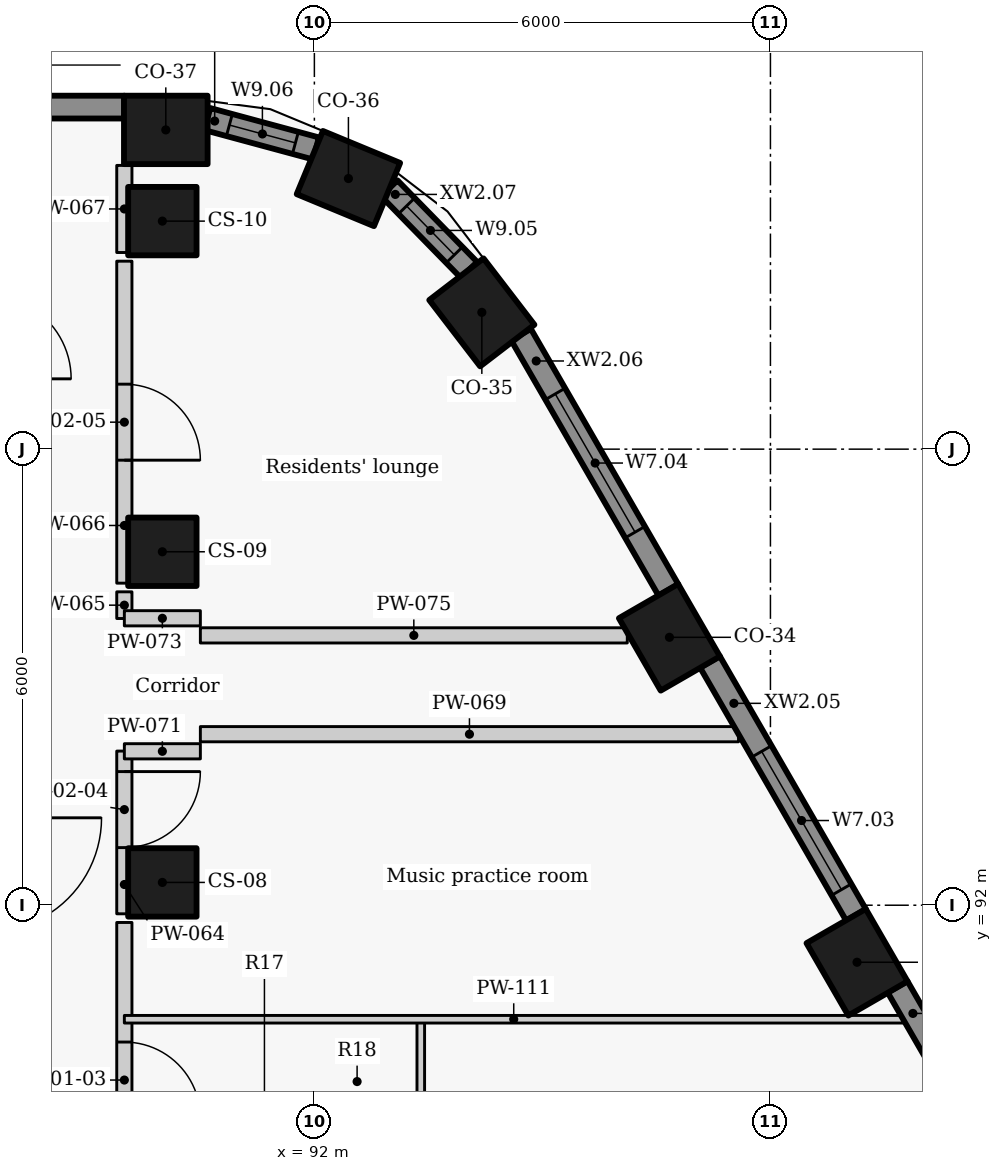
"""IFC4 building model, lengths in metres.
Left out: names, types, materials, properties, quantities, classifications, styles, units other than length and angle.
Written with IfcOpenShell. Run it as: python <this file> out.ifc"""

import sys

from ifc_helpers import new_model, si_unit, direction, frame, frame_2d, origin, origin_2d, place, context, subcontext, project, spatial, rectangle, extrude, element, fill, save


model = new_model("IFC4")
c1 = context("Model", 3, precision=1e-05, world=origin(), true_north=direction((0.0, 1.0)))
c2 = subcontext(c1, "Body", "Model", "MODEL_VIEW")
j1 = project(units=[si_unit("LENGTHUNIT", "METRE"), si_unit("PLANEANGLEUNIT", "RADIAN")], contexts=[c1])
p1 = place(None, origin())
s1 = spatial("IfcSite", under=j1, at=p1, CompositionType="ELEMENT")
p2 = place(p1, origin())
s2 = spatial("IfcBuilding", under=s1, at=p2, CompositionType="ELEMENT")
p3 = place(p2, frame((0.0, 0.0, 259.2)))
s3 = spatial("IfcBuildingStorey", under=s2, at=p3, CompositionType="ELEMENT", Elevation=259.2)
for number, where, z_axis, x_axis in (
    (1, (99.139, 91.25, 0.0), (0.0, 0.0, 1.0), (-0.5, 0.866, 0.0)),
    (2, (96.671, 95.525, 0.0), (0.0, 0.0, 1.0), (-0.5, 0.866, 0.0)),
    (3, (94.203, 99.8, 0.0), (0.0, 0.0, 1.0), (-0.609, 0.793, 0.0)),
    (4, (92.448, 101.56, 0.0), (0.0, 0.0, 1.0), (-0.924, 0.383, 0.0)),
    (5, (90.045, 102.2, 0.0), (0.0, 0.0, 1.0), (-1.0, 0.0, 0.0)),
):
    element("IfcColumn", number, at=place(p3, frame(where, z_axis=z_axis, x_axis=x_axis)), inside=s3, PredefinedType="COLUMN", context=c2, shape_type="SweptSolid", body=[
        extrude(rectangle(XDim=1.1, YDim=0.9, at=origin_2d()), origin(), (0.0, 0.0, 1.0), 3.3),
    ])
for number, where, z_axis, x_axis in (
    (6, (90.0, 92.3, 0.0), (0.0, 0.0, 1.0), (0.0, 1.0, 0.0)),
    (7, (90.0, 96.65, 0.0), (0.0, 0.0, 1.0), (0.0, 1.0, 0.0)),
    (8, (90.0, 101.0, 0.0), (0.0, 0.0, 1.0), (0.0, 1.0, 0.0)),
):
    element("IfcColumn", number, at=place(p3, frame(where, z_axis=z_axis, x_axis=x_axis)), inside=s3, PredefinedType="COLUMN", context=c2, shape_type="SweptSolid", body=[
        extrude(rectangle(XDim=0.9, YDim=0.9, at=origin_2d()), origin(), (0.0, 0.0, 1.0), 3.3),
    ])
p4 = place(p3, frame((101.446, 87.855, 0.0), z_axis=(0.0, 0.0, 1.0), x_axis=(-0.500010404316, 0.866019396766, 0.0)))
e9 = element("IfcWall", 9, at=p4, inside=s3, PredefinedType="SOLIDWALL", context=c2, shape_type="SweptSolid", body=[
    extrude(rectangle(XDim=3.547, YDim=0.3, at=frame_2d((1.774, 0.0))), origin(), (0.0, 0.0, 1.0), 2.425),
])
p5 = place(p4, frame((0.538, 0.0, 0.9)))
e10 = element("IfcOpeningElement", 10, at=p5, cuts=e9, PredefinedType="OPENING", context=c2, shape_type="SweptSolid", body=[
    extrude(rectangle(XDim=2.1, YDim=1.1, at=frame_2d((1.05, 0.55))), frame((0.0, 0.16, 0.0), z_axis=(0.0, -1.0, 0.0), x_axis=(1.0, 0.0, 0.0)), (0.0, 0.0, 1.0), 0.32),
])
p6 = place(p3, frame((99.126, 91.873, 0.0), z_axis=(0.0, 0.0, 1.0), x_axis=(-0.499984490703, 0.866034357896, 0.0)))
e11 = element("IfcWall", 11, at=p6, inside=s3, PredefinedType="SOLIDWALL", context=c2, shape_type="SweptSolid", body=[
    extrude(rectangle(XDim=3.844, YDim=0.3, at=frame_2d((1.922, 0.0))), origin(), (0.0, 0.0, 1.0), 2.425),
])
p7 = place(p6, frame((0.384, 0.0, 0.9)))
e12 = element("IfcOpeningElement", 12, at=p7, cuts=e11, PredefinedType="OPENING", context=c2, shape_type="SweptSolid", body=[
    extrude(rectangle(XDim=2.1, YDim=1.1, at=frame_2d((1.05, 0.55))), frame((0.0, 0.16, 0.0), z_axis=(0.0, -1.0, 0.0), x_axis=(1.0, 0.0, 0.0)), (0.0, 0.0, 1.0), 0.32),
])
p8 = place(p3, frame((96.658, 96.147, 0.0), z_axis=(0.0, 0.0, 1.0), x_axis=(-0.500011218404, 0.866018926739, 0.0)))
e13 = element("IfcWall", 13, at=p8, inside=s3, PredefinedType="SOLIDWALL", context=c2, shape_type="SweptSolid", body=[
    extrude(rectangle(XDim=3.879, YDim=0.3, at=frame_2d((1.939, 0.0))), origin(), (0.0, 0.0, 1.0), 2.425),
])
p9 = place(p8, frame((0.878, 0.0, 0.9)))
e14 = element("IfcOpeningElement", 14, at=p9, cuts=e13, PredefinedType="OPENING", context=c2, shape_type="SweptSolid", body=[
    extrude(rectangle(XDim=2.1, YDim=1.1, at=frame_2d((1.05, 0.55))), frame((0.0, 0.16, 0.0), z_axis=(0.0, -1.0, 0.0), x_axis=(1.0, 0.0, 0.0)), (0.0, 0.0, 1.0), 0.32),
])
p10 = place(p3, frame((94.034, 100.358, 0.0), z_axis=(0.0, 0.0, 1.0), x_axis=(-0.698675602211, 0.71543860874, 0.0)))
e15 = element("IfcWall", 15, at=p10, inside=s3, PredefinedType="SOLIDWALL", context=c2, shape_type="SweptSolid", body=[
    extrude(rectangle(XDim=1.5, YDim=0.3, at=frame_2d((0.75, 0.0))), origin(), (0.0, 0.0, 1.0), 2.425),
])
p11 = place(p10, frame((0.276, 0.0, 0.9)))
e16 = element("IfcOpeningElement", 16, at=p11, cuts=e15, PredefinedType="OPENING", context=c2, shape_type="SweptSolid", body=[
    extrude(rectangle(XDim=0.9, YDim=1.1, at=frame_2d((0.45, 0.55))), frame((0.0, 0.16, 0.0), z_axis=(0.0, -1.0, 0.0), x_axis=(1.0, 0.0, 0.0)), (0.0, 0.0, 1.0), 0.32),
])
p12 = place(p3, frame((92.021, 101.956, 0.0), z_axis=(0.0, 0.0, 1.0), x_axis=(-0.965392564919, 0.260801065181, 0.0)))
e17 = element("IfcWall", 17, at=p12, inside=s3, PredefinedType="SOLIDWALL", context=c2, shape_type="SweptSolid", body=[
    extrude(rectangle(XDim=1.481, YDim=0.3, at=frame_2d((0.74, 0.0))), origin(), (0.0, 0.0, 1.0), 2.425),
])
p13 = place(p12, frame((0.28, 0.0, 0.9)))
e18 = element("IfcOpeningElement", 18, at=p13, cuts=e17, PredefinedType="OPENING", context=c2, shape_type="SweptSolid", body=[
    extrude(rectangle(XDim=0.9, YDim=1.1, at=frame_2d((0.45, 0.55))), frame((0.0, 0.16, 0.0), z_axis=(0.0, -1.0, 0.0), x_axis=(1.0, 0.0, 0.0)), (0.0, 0.0, 1.0), 0.32),
])
p14 = place(p3, frame((89.499, 102.5, 0.0), z_axis=(0.0, 0.0, 1.0), x_axis=(-1.0, 0.0, 0.0)))
e19 = element("IfcWall", 19, at=p14, inside=s3, PredefinedType="SOLIDWALL", context=c2, shape_type="SweptSolid", body=[
    extrude(rectangle(XDim=19.033, YDim=0.3, at=frame_2d((9.517, 0.0))), origin(), (0.0, 0.0, 1.0), 2.425),
])
p15 = place(p3, frame((89.5, 91.773, 0.0), z_axis=(0.0, 0.0, 1.0), x_axis=(0.0, -1.0, 0.0)))
e20 = element("IfcWall", 20, at=p15, inside=s3, PredefinedType="PARTITIONING", context=c2, shape_type="SweptSolid", body=[
    extrude(rectangle(XDim=4.236, YDim=0.2, at=frame_2d((2.118, 0.0))), origin(), (0.0, 0.0, 1.0), 3.025),
])
p16 = place(p15, frame((1.573, 0.0, 0.0)))
e21 = element("IfcOpeningElement", 21, at=p16, cuts=e20, PredefinedType="OPENING", context=c2, shape_type="SweptSolid", body=[
    extrude(rectangle(XDim=1.0, YDim=2.1, at=frame_2d((0.5, 1.05))), frame((0.0, 0.11, 0.0), z_axis=(0.0, -1.0, 0.0), x_axis=(1.0, 0.0, 0.0)), (0.0, 0.0, 1.0), 0.22),
])
p17 = place(p3, frame((89.5, 94.028, 0.0), z_axis=(0.0, 0.0, 1.0), x_axis=(0.0, -1.0, 0.0)))
e22 = element("IfcWall", 22, at=p17, inside=s3, PredefinedType="PARTITIONING", context=c2, shape_type="SweptSolid", body=[
    extrude(rectangle(XDim=2.141, YDim=0.2, at=frame_2d((1.071, 0.0))), origin(), (0.0, 0.0, 1.0), 3.025),
])
p18 = place(p17, frame((0.27, 0.0, 0.0)))
e23 = element("IfcOpeningElement", 23, at=p18, cuts=e22, PredefinedType="OPENING", context=c2, shape_type="SweptSolid", body=[
    extrude(rectangle(XDim=1.0, YDim=2.1, at=frame_2d((0.5, 1.05))), frame((0.0, 0.11, 0.0), z_axis=(0.0, -1.0, 0.0), x_axis=(1.0, 0.0, 0.0)), (0.0, 0.0, 1.0), 0.22),
])
p19 = place(p3, frame((89.5, 95.772, 0.0), z_axis=(0.0, 0.0, 1.0), x_axis=(0.0, 1.0, 0.0)))
e24 = element("IfcWall", 24, at=p19, inside=s3, PredefinedType="PARTITIONING", context=c2, shape_type="SweptSolid", body=[
    extrude(rectangle(XDim=0.351, YDim=0.2, at=frame_2d((0.176, 0.0))), origin(), (0.0, 0.0, 1.0), 3.025),
])
p20 = place(p3, frame((89.5, 100.473, 0.0), z_axis=(0.0, 0.0, 1.0), x_axis=(0.0, -1.0, 0.0)))
e25 = element("IfcWall", 25, at=p20, inside=s3, PredefinedType="PARTITIONING", context=c2, shape_type="SweptSolid", body=[
    extrude(rectangle(XDim=4.236, YDim=0.2, at=frame_2d((2.118, 0.0))), origin(), (0.0, 0.0, 1.0), 3.025),
])
p21 = place(p20, frame((1.618, 0.0, 0.0)))
e26 = element("IfcOpeningElement", 26, at=p21, cuts=e25, PredefinedType="OPENING", context=c2, shape_type="SweptSolid", body=[
    extrude(rectangle(XDim=1.0, YDim=2.1, at=frame_2d((0.5, 1.05))), frame((0.0, 0.11, 0.0), z_axis=(0.0, -1.0, 0.0), x_axis=(1.0, 0.0, 0.0)), (0.0, 0.0, 1.0), 0.22),
])
p22 = place(p3, frame((89.5, 100.587, 0.0), z_axis=(0.0, 0.0, 1.0), x_axis=(0.0, 1.0, 0.0)))
e27 = element("IfcWall", 27, at=p22, inside=s3, PredefinedType="PARTITIONING", context=c2, shape_type="SweptSolid", body=[
    extrude(rectangle(XDim=1.146, YDim=0.2, at=frame_2d((0.573, 0.0))), origin(), (0.0, 0.0, 1.0), 3.025),
])
p23 = place(p3, frame((90.5, 94.25, 0.0), z_axis=(0.0, 0.0, 1.0), x_axis=(1.0, 0.0, 0.0)))
e28 = element("IfcWall", 28, at=p23, inside=s3, PredefinedType="PARTITIONING", context=c2, shape_type="SweptSolid", body=[
    extrude(rectangle(XDim=7.08, YDim=0.2, at=frame_2d((3.54, 0.0))), origin(), (0.0, 0.0, 1.0), 2.405),
])
for number, where, z_axis, x_axis in (
    (29, (89.5, 94.025, 0.0), (0.0, 0.0, 1.0), (1.0, 0.0, 0.0)),
    (30, (89.5, 95.775, 0.0), (0.0, 0.0, 1.0), (1.0, 0.0, 0.0)),
):
    element("IfcWall", number, at=place(p3, frame(where, z_axis=z_axis, x_axis=x_axis)), inside=s3, PredefinedType="PARTITIONING", context=c2, shape_type="SweptSolid", body=[
        extrude(rectangle(XDim=1.0, YDim=0.2, at=frame_2d((0.5, 0.0))), origin(), (0.0, 0.0, 1.0), 2.505),
    ])
p24 = place(p3, frame((90.5, 95.55, 0.0), z_axis=(0.0, 0.0, 1.0), x_axis=(1.0, 0.0, 0.0)))
e31 = element("IfcWall", 31, at=p24, inside=s3, PredefinedType="PARTITIONING", context=c2, shape_type="SweptSolid", body=[
    extrude(rectangle(XDim=5.617, YDim=0.2, at=frame_2d((2.808, 0.0))), origin(), (0.0, 0.0, 1.0), 3.025),
])
p25 = place(p3, frame((93.4, 90.5, 0.0), z_axis=(0.0, 0.0, 1.0), x_axis=(0.0, -1.0, 0.0)))
e32 = element("IfcWall", 32, at=p25, inside=s3, PredefinedType="PARTITIONING", context=c2, shape_type="SweptSolid", body=[
    extrude(rectangle(XDim=7.4, YDim=0.1, at=frame_2d((3.7, 0.0))), origin(), (0.0, 0.0, 1.0), 3.025),
])
p26 = place(p25, frame((3.25, 0.0, 0.0)))
e33 = element("IfcOpeningElement", 33, at=p26, cuts=e32, PredefinedType="OPENING", context=c2, shape_type="SweptSolid", body=[
    extrude(rectangle(XDim=0.9, YDim=2.1, at=frame_2d((0.45, 1.05))), frame((0.0, 0.06, 0.0), z_axis=(0.0, -1.0, 0.0), x_axis=(1.0, 0.0, 0.0)), (0.0, 0.0, 1.0), 0.12),
])
p27 = place(p3, frame((89.5, 90.5, 0.0), z_axis=(0.0, 0.0, 1.0), x_axis=(1.0, 0.0, 0.0)))
e34 = element("IfcWall", 34, at=p27, inside=s3, PredefinedType="PARTITIONING", context=c2, shape_type="SweptSolid", body=[
    extrude(rectangle(XDim=10.245, YDim=0.1, at=frame_2d((5.123, 0.0))), origin(), (0.0, 0.0, 1.0), 2.405),
])
p28 = place(p7, origin())
e35 = element("IfcWindow", 35, at=p28, inside=s3, PartitioningType="SINGLE_PANEL", PredefinedType="WINDOW", context=c2, shape_type="SweptSolid", body=[
    extrude(rectangle(XDim=2.1, YDim=1.1, at=frame_2d((1.05, 0.55))), frame((0.0, 0.03, 0.0), z_axis=(0.0, -1.0, 0.0), x_axis=(1.0, 0.0, 0.0)), (0.0, 0.0, 1.0), 0.06),
])
fill(e12, e35)
p29 = place(p9, origin())
e36 = element("IfcWindow", 36, at=p29, inside=s3, PartitioningType="SINGLE_PANEL", PredefinedType="WINDOW", context=c2, shape_type="SweptSolid", body=[
    extrude(rectangle(XDim=2.1, YDim=1.1, at=frame_2d((1.05, 0.55))), frame((0.0, 0.03, 0.0), z_axis=(0.0, -1.0, 0.0), x_axis=(1.0, 0.0, 0.0)), (0.0, 0.0, 1.0), 0.06),
])
fill(e14, e36)
p30 = place(p11, origin())
e37 = element("IfcWindow", 37, at=p30, inside=s3, PartitioningType="SINGLE_PANEL", PredefinedType="WINDOW", context=c2, shape_type="SweptSolid", body=[
    extrude(rectangle(XDim=0.9, YDim=1.1, at=frame_2d((0.45, 0.55))), frame((0.0, 0.03, 0.0), z_axis=(0.0, -1.0, 0.0), x_axis=(1.0, 0.0, 0.0)), (0.0, 0.0, 1.0), 0.06),
])
fill(e16, e37)
p31 = place(p13, origin())
e38 = element("IfcWindow", 38, at=p31, inside=s3, PartitioningType="SINGLE_PANEL", PredefinedType="WINDOW", context=c2, shape_type="SweptSolid", body=[
    extrude(rectangle(XDim=0.9, YDim=1.1, at=frame_2d((0.45, 0.55))), frame((0.0, 0.03, 0.0), z_axis=(0.0, -1.0, 0.0), x_axis=(1.0, 0.0, 0.0)), (0.0, 0.0, 1.0), 0.06),
])
fill(e18, e38)
p32 = place(p16, origin())
e39 = element("IfcDoor", 39, at=p32, inside=s3, OperationType="SINGLE_SWING_RIGHT", PredefinedType="DOOR", context=c2, shape_type="SweptSolid", body=[
    extrude(rectangle(XDim=1.0, YDim=2.1, at=frame_2d((0.5, 1.05))), frame((0.0, 0.025, 0.0), z_axis=(0.0, -1.0, 0.0), x_axis=(1.0, 0.0, 0.0)), (0.0, 0.0, 1.0), 0.05),
])
fill(e21, e39)
p33 = place(p18, origin())
e40 = element("IfcDoor", 40, at=p33, inside=s3, OperationType="SINGLE_SWING_LEFT", PredefinedType="DOOR", context=c2, shape_type="SweptSolid", body=[
    extrude(rectangle(XDim=1.0, YDim=2.1, at=frame_2d((0.5, 1.05))), frame((0.0, 0.025, 0.0), z_axis=(0.0, -1.0, 0.0), x_axis=(1.0, 0.0, 0.0)), (0.0, 0.0, 1.0), 0.05),
])
fill(e23, e40)
p34 = place(p21, origin())
e41 = element("IfcDoor", 41, at=p34, inside=s3, OperationType="SINGLE_SWING_RIGHT", PredefinedType="DOOR", context=c2, shape_type="SweptSolid", body=[
    extrude(rectangle(XDim=1.0, YDim=2.1, at=frame_2d((0.5, 1.05))), frame((0.0, 0.025, 0.0), z_axis=(0.0, -1.0, 0.0), x_axis=(1.0, 0.0, 0.0)), (0.0, 0.0, 1.0), 0.05),
])
fill(e26, e41)
save(model, sys.argv[1])
